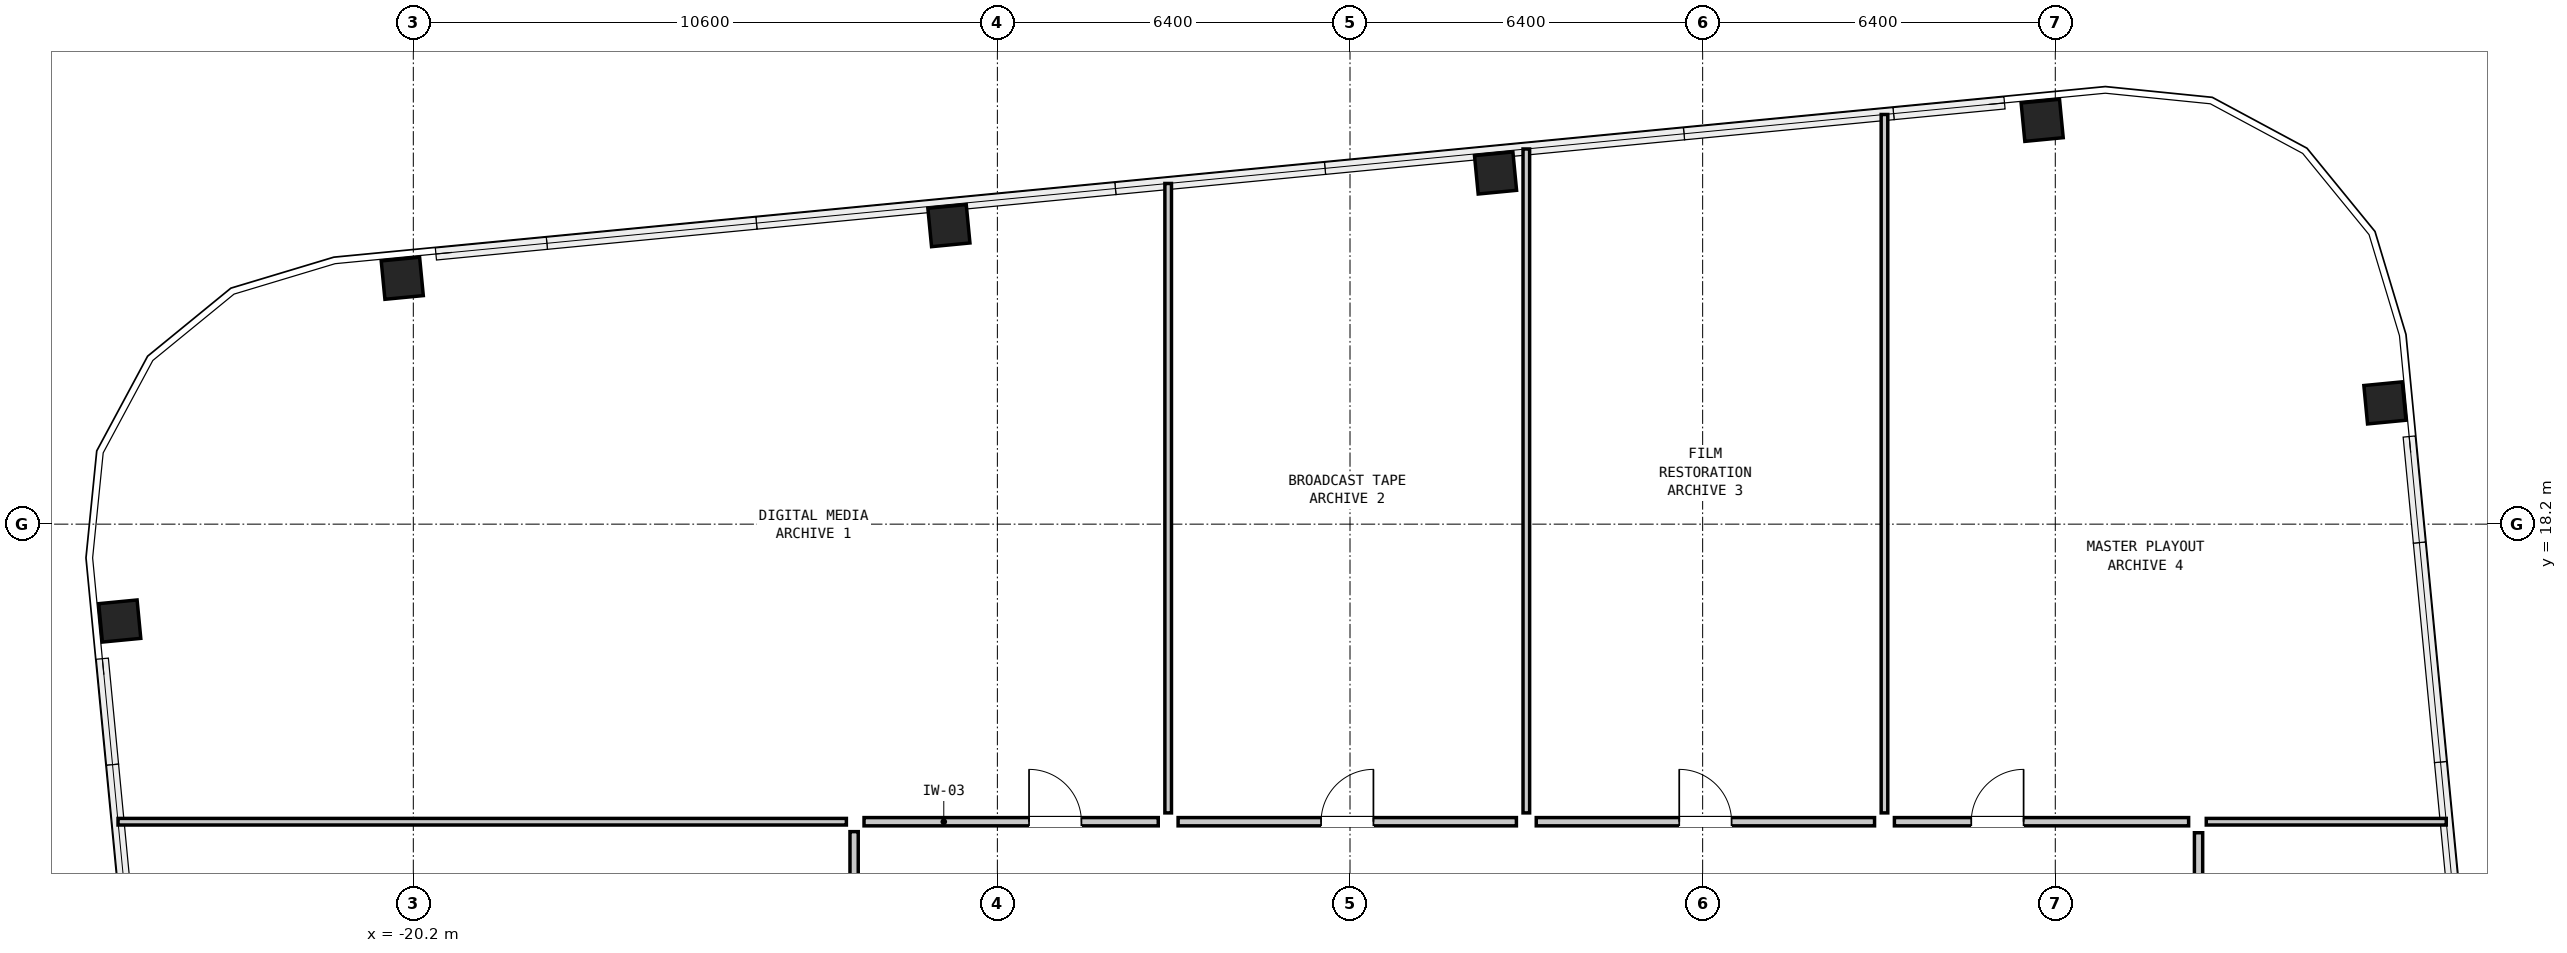
"""IFC4 building model, lengths in metres.
Left out: names, types, materials, properties, quantities, classifications, styles, units other than length and angle.
Written with IfcOpenShell. Run it as: python <this file> out.ifc"""

import sys

from ifc_helpers import new_model, si_unit, direction, frame, frame_2d, origin, origin_2d, place, context, subcontext, project, spatial, rectangle, hollow_rectangle, extrude, element, fill, save


model = new_model("IFC4")
c1 = context("Model", 3, precision=1e-05, world=origin(), true_north=direction((0.0, 1.0)))
c2 = subcontext(c1, "Body", "Model", "MODEL_VIEW")
j1 = project(units=[si_unit("LENGTHUNIT", "METRE"), si_unit("PLANEANGLEUNIT", "RADIAN")], contexts=[c1])
p1 = place(None, origin())
s1 = spatial("IfcSite", under=j1, at=p1, CompositionType="ELEMENT")
p2 = place(p1, origin())
s2 = spatial("IfcBuilding", under=s1, at=p2, CompositionType="ELEMENT")
p3 = place(p2, frame((0.0, 0.0, 174.45)))
s3 = spatial("IfcBuildingStorey", under=s2, at=p3, CompositionType="ELEMENT", Elevation=174.45)
for number, where, z_axis, x_axis in (
    (1, (15.582, 20.4, 0.0), (0.0, 0.0, 1.0), (-0.096, 0.995, 0.0)),
    (2, (9.362, 25.528, 0.0), (0.0, 0.0, 1.0), (0.995, 0.096, 0.0)),
    (3, (-0.559, 24.573, 0.0), (0.0, 0.0, 1.0), (0.995, 0.096, 0.0)),
    (4, (-10.479, 23.617, 0.0), (0.0, 0.0, 1.0), (0.995, 0.096, 0.0)),
    (5, (-20.4, 22.662, 0.0), (0.0, 0.0, 1.0), (0.995, 0.096, 0.0)),
    (6, (-25.528, 16.442, 0.0), (0.0, 0.0, 1.0), (-0.096, 0.995, 0.0)),
):
    element("IfcColumn", number, at=place(p3, frame(where, z_axis=z_axis, x_axis=x_axis)), inside=s3, PredefinedType="COLUMN", context=c2, shape_type="SweptSolid", body=[
        extrude(hollow_rectangle(XDim=0.7, YDim=0.7, WallThickness=0.045, at=origin_2d()), origin(), (0.0, 0.0, 1.0), 3.05),
    ])
p4 = place(p3, frame((-25.559, 12.8, 0.0), z_axis=(0.0, 0.0, 1.0), x_axis=(1.0, 0.0, 0.0)))
e7 = element("IfcWall", 7, at=p4, inside=s3, PredefinedType="PARTITIONING", context=c2, shape_type="SweptSolid", body=[
    extrude(rectangle(XDim=13.219, YDim=0.12, at=frame_2d((6.609, 0.0))), origin(), (0.0, 0.0, 1.0), 2.83),
])
p5 = place(p3, frame((12.34, 12.8, 0.0), z_axis=(0.0, 0.0, 1.0), x_axis=(1.0, 0.0, 0.0)))
e8 = element("IfcWall", 8, at=p5, inside=s3, PredefinedType="PARTITIONING", context=c2, shape_type="SweptSolid", body=[
    extrude(rectangle(XDim=4.355, YDim=0.12, at=frame_2d((2.178, 0.0))), origin(), (0.0, 0.0, 1.0), 2.83),
])
p6 = place(p3, frame((-6.5, 12.96, 0.0), z_axis=(0.0, 0.0, 1.0), x_axis=(0.0, 1.0, 0.0)))
e9 = element("IfcWall", 9, at=p6, inside=s3, PredefinedType="PARTITIONING", context=c2, shape_type="SweptSolid", body=[
    extrude(rectangle(XDim=11.422, YDim=0.12, at=frame_2d((5.711, 0.0))), origin(), (0.0, 0.0, 1.0), 2.347),
])
p7 = place(p3, frame((0.0, 12.96, 0.0), z_axis=(0.0, 0.0, 1.0), x_axis=(0.0, 1.0, 0.0)))
e10 = element("IfcWall", 10, at=p7, inside=s3, PredefinedType="PARTITIONING", context=c2, shape_type="SweptSolid", body=[
    extrude(rectangle(XDim=12.048, YDim=0.12, at=frame_2d((6.024, 0.0))), origin(), (0.0, 0.0, 1.0), 2.347),
])
p8 = place(p3, frame((6.5, 12.96, 0.0), z_axis=(0.0, 0.0, 1.0), x_axis=(0.0, 1.0, 0.0)))
e11 = element("IfcWall", 11, at=p8, inside=s3, PredefinedType="PARTITIONING", context=c2, shape_type="SweptSolid", body=[
    extrude(rectangle(XDim=12.674, YDim=0.12, at=frame_2d((6.337, 0.0))), origin(), (0.0, 0.0, 1.0), 2.347),
])
p9 = place(p3, frame((-12.02, 12.8, 0.0), z_axis=(0.0, 0.0, 1.0), x_axis=(1.0, 0.0, 0.0)))
e12 = element("IfcWall", 12, at=p9, inside=s3, PredefinedType="PARTITIONING", context=c2, shape_type="SweptSolid", body=[
    extrude(rectangle(XDim=5.34, YDim=0.15, at=frame_2d((2.67, 0.0))), origin(), (0.0, 0.0, 1.0), 2.83),
])
p10 = place(p9, frame((2.995, 0.0, 0.0)))
e13 = element("IfcOpeningElement", 13, at=p10, cuts=e12, PredefinedType="OPENING", context=c2, shape_type="SweptSolid", body=[
    extrude(rectangle(XDim=0.95, YDim=2.1, at=frame_2d((0.475, 1.05))), frame((0.0, 0.087, 0.0), z_axis=(0.0, -1.0, 0.0), x_axis=(1.0, 0.0, 0.0)), (0.0, 0.0, 1.0), 0.174),
])
p11 = place(p3, frame((-6.32, 12.8, 0.0), z_axis=(0.0, 0.0, 1.0), x_axis=(1.0, 0.0, 0.0)))
e14 = element("IfcWall", 14, at=p11, inside=s3, PredefinedType="PARTITIONING", context=c2, shape_type="SweptSolid", body=[
    extrude(rectangle(XDim=6.14, YDim=0.15, at=frame_2d((3.07, 0.0))), origin(), (0.0, 0.0, 1.0), 2.83),
])
p12 = place(p11, frame((2.595, 0.0, 0.0)))
e15 = element("IfcOpeningElement", 15, at=p12, cuts=e14, PredefinedType="OPENING", context=c2, shape_type="SweptSolid", body=[
    extrude(rectangle(XDim=0.95, YDim=2.1, at=frame_2d((0.475, 1.05))), frame((0.0, 0.087, 0.0), z_axis=(0.0, -1.0, 0.0), x_axis=(1.0, 0.0, 0.0)), (0.0, 0.0, 1.0), 0.174),
])
p13 = place(p3, frame((0.18, 12.8, 0.0), z_axis=(0.0, 0.0, 1.0), x_axis=(1.0, 0.0, 0.0)))
e16 = element("IfcWall", 16, at=p13, inside=s3, PredefinedType="PARTITIONING", context=c2, shape_type="SweptSolid", body=[
    extrude(rectangle(XDim=6.14, YDim=0.15, at=frame_2d((3.07, 0.0))), origin(), (0.0, 0.0, 1.0), 2.83),
])
p14 = place(p13, frame((2.595, 0.0, 0.0)))
e17 = element("IfcOpeningElement", 17, at=p14, cuts=e16, PredefinedType="OPENING", context=c2, shape_type="SweptSolid", body=[
    extrude(rectangle(XDim=0.95, YDim=2.1, at=frame_2d((0.475, 1.05))), frame((0.0, 0.087, 0.0), z_axis=(0.0, -1.0, 0.0), x_axis=(1.0, 0.0, 0.0)), (0.0, 0.0, 1.0), 0.174),
])
p15 = place(p3, frame((6.68, 12.8, 0.0), z_axis=(0.0, 0.0, 1.0), x_axis=(1.0, 0.0, 0.0)))
e18 = element("IfcWall", 18, at=p15, inside=s3, PredefinedType="PARTITIONING", context=c2, shape_type="SweptSolid", body=[
    extrude(rectangle(XDim=5.34, YDim=0.15, at=frame_2d((2.67, 0.0))), origin(), (0.0, 0.0, 1.0), 2.83),
])
p16 = place(p15, frame((1.395, 0.0, 0.0)))
e19 = element("IfcOpeningElement", 19, at=p16, cuts=e18, PredefinedType="OPENING", context=c2, shape_type="SweptSolid", body=[
    extrude(rectangle(XDim=0.95, YDim=2.1, at=frame_2d((0.475, 1.05))), frame((0.0, 0.087, 0.0), z_axis=(0.0, -1.0, 0.0), x_axis=(1.0, 0.0, 0.0)), (0.0, 0.0, 1.0), 0.174),
])
p17 = place(p3, frame((-12.2, 3.68, 0.0), z_axis=(0.0, 0.0, 1.0), x_axis=(0.0, 1.0, 0.0)))
e20 = element("IfcWall", 20, at=p17, inside=s3, PredefinedType="PARTITIONING", context=c2, shape_type="SweptSolid", body=[
    extrude(rectangle(XDim=8.94, YDim=0.15, at=frame_2d((4.47, 0.0))), origin(), (0.0, 0.0, 1.0), 2.83),
])
p18 = place(p17, frame((3.995, 0.0, 0.0)))
e21 = element("IfcOpeningElement", 21, at=p18, cuts=e20, PredefinedType="OPENING", context=c2, shape_type="SweptSolid", body=[
    extrude(rectangle(XDim=0.95, YDim=2.1, at=frame_2d((0.475, 1.05))), frame((0.0, 0.087, 0.0), z_axis=(0.0, -1.0, 0.0), x_axis=(1.0, 0.0, 0.0)), (0.0, 0.0, 1.0), 0.174),
])
p19 = place(p3, frame((12.2, 3.8, 0.0), z_axis=(0.0, 0.0, 1.0), x_axis=(0.0, 1.0, 0.0)))
e22 = element("IfcWall", 22, at=p19, inside=s3, PredefinedType="PARTITIONING", context=c2, shape_type="SweptSolid", body=[
    extrude(rectangle(XDim=8.8, YDim=0.15, at=frame_2d((4.4, 0.0))), origin(), (0.0, 0.0, 1.0), 2.83),
])
p20 = place(p19, frame((3.925, 0.0, 0.0)))
e23 = element("IfcOpeningElement", 23, at=p20, cuts=e22, PredefinedType="OPENING", context=c2, shape_type="SweptSolid", body=[
    extrude(rectangle(XDim=0.95, YDim=2.1, at=frame_2d((0.475, 1.05))), frame((0.0, 0.087, 0.0), z_axis=(0.0, -1.0, 0.0), x_axis=(1.0, 0.0, 0.0)), (0.0, 0.0, 1.0), 0.174),
])
p21 = place(p10, origin())
e24 = element("IfcDoor", 24, at=p21, inside=s3, OperationType="SINGLE_SWING_LEFT", PredefinedType="DOOR", context=c2, shape_type="SweptSolid", body=[
    extrude(rectangle(XDim=0.95, YDim=2.1, at=frame_2d((0.475, 1.05))), frame((0.0, 0.025, 0.0), z_axis=(0.0, -1.0, 0.0), x_axis=(1.0, 0.0, 0.0)), (0.0, 0.0, 1.0), 0.05),
])
fill(e13, e24)
p22 = place(p12, origin())
e25 = element("IfcDoor", 25, at=p22, inside=s3, OperationType="SINGLE_SWING_RIGHT", PredefinedType="DOOR", context=c2, shape_type="SweptSolid", body=[
    extrude(rectangle(XDim=0.95, YDim=2.1, at=frame_2d((0.475, 1.05))), frame((0.0, 0.025, 0.0), z_axis=(0.0, -1.0, 0.0), x_axis=(1.0, 0.0, 0.0)), (0.0, 0.0, 1.0), 0.05),
])
fill(e15, e25)
p23 = place(p14, origin())
e26 = element("IfcDoor", 26, at=p23, inside=s3, OperationType="SINGLE_SWING_LEFT", PredefinedType="DOOR", context=c2, shape_type="SweptSolid", body=[
    extrude(rectangle(XDim=0.95, YDim=2.1, at=frame_2d((0.475, 1.05))), frame((0.0, 0.025, 0.0), z_axis=(0.0, -1.0, 0.0), x_axis=(1.0, 0.0, 0.0)), (0.0, 0.0, 1.0), 0.05),
])
fill(e17, e26)
p24 = place(p16, origin())
e27 = element("IfcDoor", 27, at=p24, inside=s3, OperationType="SINGLE_SWING_RIGHT", PredefinedType="DOOR", context=c2, shape_type="SweptSolid", body=[
    extrude(rectangle(XDim=0.95, YDim=2.1, at=frame_2d((0.475, 1.05))), frame((0.0, 0.025, 0.0), z_axis=(0.0, -1.0, 0.0), x_axis=(1.0, 0.0, 0.0)), (0.0, 0.0, 1.0), 0.05),
])
fill(e19, e27)
save(model, sys.argv[1])
